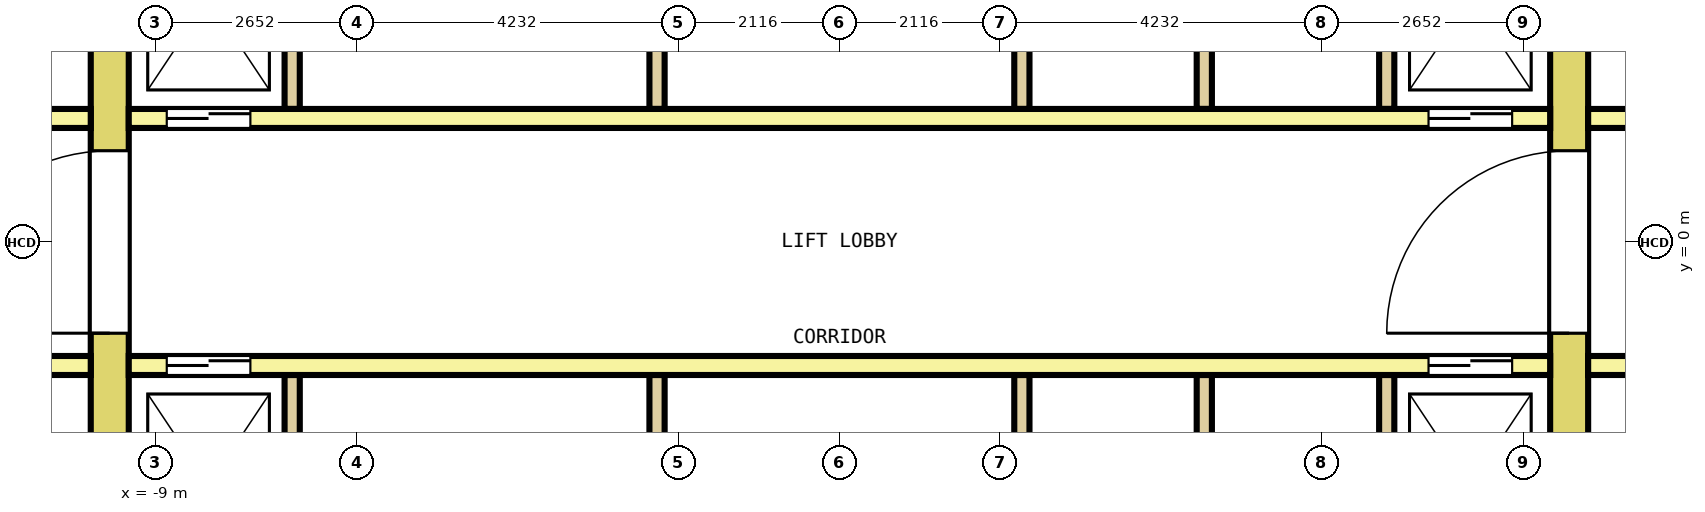
"""IFC4 building model, lengths in metres.
Left out: names, types, materials, properties, quantities, classifications, styles, units other than length and angle.
Written with IfcOpenShell. Run it as: python <this file> out.ifc"""

import sys

from ifc_helpers import new_model, si_unit, direction, frame, frame_2d, origin, place, context, subcontext, project, spatial, rectangle, extrude, element, fill, save


model = new_model("IFC4")
c1 = context("Model", 3, precision=1e-05, world=origin(), true_north=direction((0.0, 1.0)))
c2 = subcontext(c1, "Body", "Model", "MODEL_VIEW")
j1 = project(units=[si_unit("LENGTHUNIT", "METRE"), si_unit("PLANEANGLEUNIT", "RADIAN")], contexts=[c1])
p1 = place(None, origin())
s1 = spatial("IfcSite", under=j1, at=p1, CompositionType="ELEMENT")
p2 = place(p1, origin())
s2 = spatial("IfcBuilding", under=s1, at=p2, CompositionType="ELEMENT")
p3 = place(p2, frame((0.0, 0.0, 98.4)))
s3 = spatial("IfcBuildingStorey", under=s2, at=p3, CompositionType="ELEMENT", Elevation=98.4)
p4 = place(p3, frame((-9.6, -7.7, 0.0), z_axis=(0.0, 0.0, 1.0), x_axis=(0.0, 1.0, 0.0)))
e1 = element("IfcWall", 1, at=p4, inside=s3, PredefinedType="SHEAR", context=c2, shape_type="SweptSolid", body=[
    extrude(rectangle(XDim=15.4, YDim=0.5, at=frame_2d((7.7, 0.0))), origin(), (0.0, 0.0, 1.0), 4.1),
])
p5 = place(p4, frame((6.5, 0.0, 0.0)))
e2 = element("IfcOpeningElement", 2, at=p5, cuts=e1, PredefinedType="OPENING", context=c2, shape_type="SweptSolid", body=[
    extrude(rectangle(XDim=2.4, YDim=2.1, at=frame_2d((1.2, 1.05))), frame((0.0, 0.26, 0.0), z_axis=(0.0, -1.0, 0.0), x_axis=(1.0, 0.0, 0.0)), (0.0, 0.0, 1.0), 0.52),
])
p6 = place(p4, frame((13.4, 0.0, 0.0)))
e3 = element("IfcOpeningElement", 3, at=p6, cuts=e1, PredefinedType="OPENING", context=c2, shape_type="SweptSolid", body=[
    extrude(rectangle(XDim=1.2, YDim=2.1, at=frame_2d((0.6, 1.05))), frame((0.0, 0.26, 0.0), z_axis=(0.0, -1.0, 0.0), x_axis=(1.0, 0.0, 0.0)), (0.0, 0.0, 1.0), 0.52),
])
p7 = place(p4, frame((0.8, 0.0, 0.0)))
e4 = element("IfcOpeningElement", 4, at=p7, cuts=e1, PredefinedType="OPENING", context=c2, shape_type="SweptSolid", body=[
    extrude(rectangle(XDim=1.2, YDim=2.1, at=frame_2d((0.6, 1.05))), frame((0.0, 0.26, 0.0), z_axis=(0.0, -1.0, 0.0), x_axis=(1.0, 0.0, 0.0)), (0.0, 0.0, 1.0), 0.52),
])
p8 = place(p3, frame((9.6, -7.7, 0.0), z_axis=(0.0, 0.0, 1.0), x_axis=(0.0, 1.0, 0.0)))
e5 = element("IfcWall", 5, at=p8, inside=s3, PredefinedType="SHEAR", context=c2, shape_type="SweptSolid", body=[
    extrude(rectangle(XDim=15.4, YDim=0.5, at=frame_2d((7.7, 0.0))), origin(), (0.0, 0.0, 1.0), 4.1),
])
p9 = place(p8, frame((6.5, 0.0, 0.0)))
e6 = element("IfcOpeningElement", 6, at=p9, cuts=e5, PredefinedType="OPENING", context=c2, shape_type="SweptSolid", body=[
    extrude(rectangle(XDim=2.4, YDim=2.1, at=frame_2d((1.2, 1.05))), frame((0.0, 0.26, 0.0), z_axis=(0.0, -1.0, 0.0), x_axis=(1.0, 0.0, 0.0)), (0.0, 0.0, 1.0), 0.52),
])
p10 = place(p8, frame((13.4, 0.0, 0.0)))
e7 = element("IfcOpeningElement", 7, at=p10, cuts=e5, PredefinedType="OPENING", context=c2, shape_type="SweptSolid", body=[
    extrude(rectangle(XDim=1.2, YDim=2.1, at=frame_2d((0.6, 1.05))), frame((0.0, 0.26, 0.0), z_axis=(0.0, -1.0, 0.0), x_axis=(1.0, 0.0, 0.0)), (0.0, 0.0, 1.0), 0.52),
])
p11 = place(p8, frame((0.9, 0.0, 0.0)))
e8 = element("IfcOpeningElement", 8, at=p11, cuts=e5, PredefinedType="OPENING", context=c2, shape_type="SweptSolid", body=[
    extrude(rectangle(XDim=1.0, YDim=2.1, at=frame_2d((0.5, 1.05))), frame((0.0, 0.26, 0.0), z_axis=(0.0, -1.0, 0.0), x_axis=(1.0, 0.0, 0.0)), (0.0, 0.0, 1.0), 0.52),
])
p12 = place(p3, frame((-12.8, 1.625, 0.0), z_axis=(0.0, 0.0, 1.0), x_axis=(1.0, 0.0, 0.0)))
e9 = element("IfcWall", 9, at=p12, inside=s3, PredefinedType="SOLIDWALL", context=c2, shape_type="SweptSolid", body=[
    extrude(rectangle(XDim=2.95, YDim=0.25, at=frame_2d((1.475, 0.0))), origin(), (0.0, 0.0, 1.0), 4.1),
])
p13 = place(p12, frame((0.925, 0.0, 0.0)))
e10 = element("IfcOpeningElement", 10, at=p13, cuts=e9, PredefinedType="OPENING", context=c2, shape_type="SweptSolid", body=[
    extrude(rectangle(XDim=1.1, YDim=2.1, at=frame_2d((0.55, 1.05))), frame((0.0, 0.135, 0.0), z_axis=(0.0, -1.0, 0.0), x_axis=(1.0, 0.0, 0.0)), (0.0, 0.0, 1.0), 0.27),
])
p14 = place(p3, frame((-9.35, 1.625, 0.0), z_axis=(0.0, 0.0, 1.0), x_axis=(1.0, 0.0, 0.0)))
e11 = element("IfcWall", 11, at=p14, inside=s3, PredefinedType="SOLIDWALL", context=c2, shape_type="SweptSolid", body=[
    extrude(rectangle(XDim=18.7, YDim=0.25, at=frame_2d((9.35, 0.0))), origin(), (0.0, 0.0, 1.0), 4.1),
])
p15 = place(p14, frame((0.5, 0.0, 0.0)))
e12 = element("IfcOpeningElement", 12, at=p15, cuts=e11, PredefinedType="OPENING", context=c2, shape_type="SweptSolid", body=[
    extrude(rectangle(XDim=1.1, YDim=2.1, at=frame_2d((0.55, 1.05))), frame((0.0, 0.135, 0.0), z_axis=(0.0, -1.0, 0.0), x_axis=(1.0, 0.0, 0.0)), (0.0, 0.0, 1.0), 0.27),
])
p16 = place(p14, frame((17.1, 0.0, 0.0)))
e13 = element("IfcOpeningElement", 13, at=p16, cuts=e11, PredefinedType="OPENING", context=c2, shape_type="SweptSolid", body=[
    extrude(rectangle(XDim=1.1, YDim=2.1, at=frame_2d((0.55, 1.05))), frame((0.0, 0.135, 0.0), z_axis=(0.0, -1.0, 0.0), x_axis=(1.0, 0.0, 0.0)), (0.0, 0.0, 1.0), 0.27),
])
p17 = place(p3, frame((9.85, 1.625, 0.0), z_axis=(0.0, 0.0, 1.0), x_axis=(1.0, 0.0, 0.0)))
e14 = element("IfcWall", 14, at=p17, inside=s3, PredefinedType="SOLIDWALL", context=c2, shape_type="SweptSolid", body=[
    extrude(rectangle(XDim=2.95, YDim=0.25, at=frame_2d((1.475, 0.0))), origin(), (0.0, 0.0, 1.0), 4.1),
])
p18 = place(p17, frame((0.925, 0.0, 0.0)))
e15 = element("IfcOpeningElement", 15, at=p18, cuts=e14, PredefinedType="OPENING", context=c2, shape_type="SweptSolid", body=[
    extrude(rectangle(XDim=1.1, YDim=2.1, at=frame_2d((0.55, 1.05))), frame((0.0, 0.135, 0.0), z_axis=(0.0, -1.0, 0.0), x_axis=(1.0, 0.0, 0.0)), (0.0, 0.0, 1.0), 0.27),
])
for number, where, z_axis, x_axis in (
    (16, (-7.2, 1.75, 0.0), (0.0, 0.0, 1.0), (0.0, 1.0, 0.0)),
    (17, (-2.4, 1.75, 0.0), (0.0, 0.0, 1.0), (0.0, 1.0, 0.0)),
    (18, (2.4, 1.75, 0.0), (0.0, 0.0, 1.0), (0.0, 1.0, 0.0)),
    (19, (4.8, 1.75, 0.0), (0.0, 0.0, 1.0), (0.0, 1.0, 0.0)),
    (20, (7.2, 1.75, 0.0), (0.0, 0.0, 1.0), (0.0, 1.0, 0.0)),
):
    element("IfcWall", number, at=place(p3, frame(where, z_axis=z_axis, x_axis=x_axis)), inside=s3, PredefinedType="SOLIDWALL", context=c2, shape_type="SweptSolid", body=[
        extrude(rectangle(XDim=2.9, YDim=0.2, at=frame_2d((1.45, 0.0))), origin(), (0.0, 0.0, 1.0), 4.1),
    ])
p19 = place(p3, frame((-12.8, -1.625, 0.0), z_axis=(0.0, 0.0, 1.0), x_axis=(1.0, 0.0, 0.0)))
e21 = element("IfcWall", 21, at=p19, inside=s3, PredefinedType="SOLIDWALL", context=c2, shape_type="SweptSolid", body=[
    extrude(rectangle(XDim=2.95, YDim=0.25, at=frame_2d((1.475, 0.0))), origin(), (0.0, 0.0, 1.0), 4.1),
])
p20 = place(p19, frame((0.925, 0.0, 0.0)))
e22 = element("IfcOpeningElement", 22, at=p20, cuts=e21, PredefinedType="OPENING", context=c2, shape_type="SweptSolid", body=[
    extrude(rectangle(XDim=1.1, YDim=2.1, at=frame_2d((0.55, 1.05))), frame((0.0, 0.135, 0.0), z_axis=(0.0, -1.0, 0.0), x_axis=(1.0, 0.0, 0.0)), (0.0, 0.0, 1.0), 0.27),
])
p21 = place(p3, frame((-9.35, -1.625, 0.0), z_axis=(0.0, 0.0, 1.0), x_axis=(1.0, 0.0, 0.0)))
e23 = element("IfcWall", 23, at=p21, inside=s3, PredefinedType="SOLIDWALL", context=c2, shape_type="SweptSolid", body=[
    extrude(rectangle(XDim=18.7, YDim=0.25, at=frame_2d((9.35, 0.0))), origin(), (0.0, 0.0, 1.0), 4.1),
])
p22 = place(p21, frame((0.5, 0.0, 0.0)))
e24 = element("IfcOpeningElement", 24, at=p22, cuts=e23, PredefinedType="OPENING", context=c2, shape_type="SweptSolid", body=[
    extrude(rectangle(XDim=1.1, YDim=2.1, at=frame_2d((0.55, 1.05))), frame((0.0, 0.135, 0.0), z_axis=(0.0, -1.0, 0.0), x_axis=(1.0, 0.0, 0.0)), (0.0, 0.0, 1.0), 0.27),
])
p23 = place(p21, frame((17.1, 0.0, 0.0)))
e25 = element("IfcOpeningElement", 25, at=p23, cuts=e23, PredefinedType="OPENING", context=c2, shape_type="SweptSolid", body=[
    extrude(rectangle(XDim=1.1, YDim=2.1, at=frame_2d((0.55, 1.05))), frame((0.0, 0.135, 0.0), z_axis=(0.0, -1.0, 0.0), x_axis=(1.0, 0.0, 0.0)), (0.0, 0.0, 1.0), 0.27),
])
p24 = place(p3, frame((9.85, -1.625, 0.0), z_axis=(0.0, 0.0, 1.0), x_axis=(1.0, 0.0, 0.0)))
e26 = element("IfcWall", 26, at=p24, inside=s3, PredefinedType="SOLIDWALL", context=c2, shape_type="SweptSolid", body=[
    extrude(rectangle(XDim=2.95, YDim=0.25, at=frame_2d((1.475, 0.0))), origin(), (0.0, 0.0, 1.0), 4.1),
])
p25 = place(p24, frame((0.925, 0.0, 0.0)))
e27 = element("IfcOpeningElement", 27, at=p25, cuts=e26, PredefinedType="OPENING", context=c2, shape_type="SweptSolid", body=[
    extrude(rectangle(XDim=1.1, YDim=2.1, at=frame_2d((0.55, 1.05))), frame((0.0, 0.135, 0.0), z_axis=(0.0, -1.0, 0.0), x_axis=(1.0, 0.0, 0.0)), (0.0, 0.0, 1.0), 0.27),
])
for number, where, z_axis, x_axis in (
    (28, (-7.2, -4.65, 0.0), (0.0, 0.0, 1.0), (0.0, 1.0, 0.0)),
    (29, (-2.4, -4.65, 0.0), (0.0, 0.0, 1.0), (0.0, 1.0, 0.0)),
    (30, (2.4, -4.65, 0.0), (0.0, 0.0, 1.0), (0.0, 1.0, 0.0)),
    (31, (4.8, -4.65, 0.0), (0.0, 0.0, 1.0), (0.0, 1.0, 0.0)),
    (32, (7.2, -4.65, 0.0), (0.0, 0.0, 1.0), (0.0, 1.0, 0.0)),
):
    element("IfcWall", number, at=place(p3, frame(where, z_axis=z_axis, x_axis=x_axis)), inside=s3, PredefinedType="SOLIDWALL", context=c2, shape_type="SweptSolid", body=[
        extrude(rectangle(XDim=2.9, YDim=0.2, at=frame_2d((1.45, 0.0))), origin(), (0.0, 0.0, 1.0), 4.1),
    ])
p26 = place(p15, origin())
e33 = element("IfcDoor", 33, at=p26, inside=s3, OperationType="DOUBLE_DOOR_SLIDING", PredefinedType="DOOR", context=c2, shape_type="SweptSolid", body=[
    extrude(rectangle(XDim=1.1, YDim=2.1, at=frame_2d((0.55, 1.05))), frame((0.0, 0.075, 0.0), z_axis=(0.0, -1.0, 0.0), x_axis=(1.0, 0.0, 0.0)), (0.0, 0.0, 1.0), 0.15),
])
fill(e12, e33)
p27 = place(p16, origin())
e34 = element("IfcDoor", 34, at=p27, inside=s3, OperationType="DOUBLE_DOOR_SLIDING", PredefinedType="DOOR", context=c2, shape_type="SweptSolid", body=[
    extrude(rectangle(XDim=1.1, YDim=2.1, at=frame_2d((0.55, 1.05))), frame((0.0, 0.075, 0.0), z_axis=(0.0, -1.0, 0.0), x_axis=(1.0, 0.0, 0.0)), (0.0, 0.0, 1.0), 0.15),
])
fill(e13, e34)
p28 = place(p22, origin())
e35 = element("IfcDoor", 35, at=p28, inside=s3, OperationType="DOUBLE_DOOR_SLIDING", PredefinedType="DOOR", context=c2, shape_type="SweptSolid", body=[
    extrude(rectangle(XDim=1.1, YDim=2.1, at=frame_2d((0.55, 1.05))), frame((0.0, 0.075, 0.0), z_axis=(0.0, -1.0, 0.0), x_axis=(1.0, 0.0, 0.0)), (0.0, 0.0, 1.0), 0.15),
])
fill(e24, e35)
p29 = place(p23, origin())
e36 = element("IfcDoor", 36, at=p29, inside=s3, OperationType="DOUBLE_DOOR_SLIDING", PredefinedType="DOOR", context=c2, shape_type="SweptSolid", body=[
    extrude(rectangle(XDim=1.1, YDim=2.1, at=frame_2d((0.55, 1.05))), frame((0.0, 0.075, 0.0), z_axis=(0.0, -1.0, 0.0), x_axis=(1.0, 0.0, 0.0)), (0.0, 0.0, 1.0), 0.15),
])
fill(e25, e36)
p30 = place(p5, origin())
e37 = element("IfcDoor", 37, at=p30, inside=s3, OperationType="DOUBLE_DOOR_SINGLE_SWING", PredefinedType="DOOR", context=c2, shape_type="SweptSolid", body=[
    extrude(rectangle(XDim=2.4, YDim=2.1, at=frame_2d((1.2, 1.05))), frame((0.0, 0.2, 0.0), z_axis=(0.0, -1.0, 0.0), x_axis=(1.0, 0.0, 0.0)), (0.0, 0.0, 1.0), 0.4),
])
fill(e2, e37)
p31 = place(p9, origin())
e38 = element("IfcDoor", 38, at=p31, inside=s3, OperationType="DOUBLE_DOOR_SINGLE_SWING", PredefinedType="DOOR", context=c2, shape_type="SweptSolid", body=[
    extrude(rectangle(XDim=2.4, YDim=2.1, at=frame_2d((1.2, 1.05))), frame((0.0, 0.2, 0.0), z_axis=(0.0, -1.0, 0.0), x_axis=(1.0, 0.0, 0.0)), (0.0, 0.0, 1.0), 0.4),
])
fill(e6, e38)
save(model, sys.argv[1])
